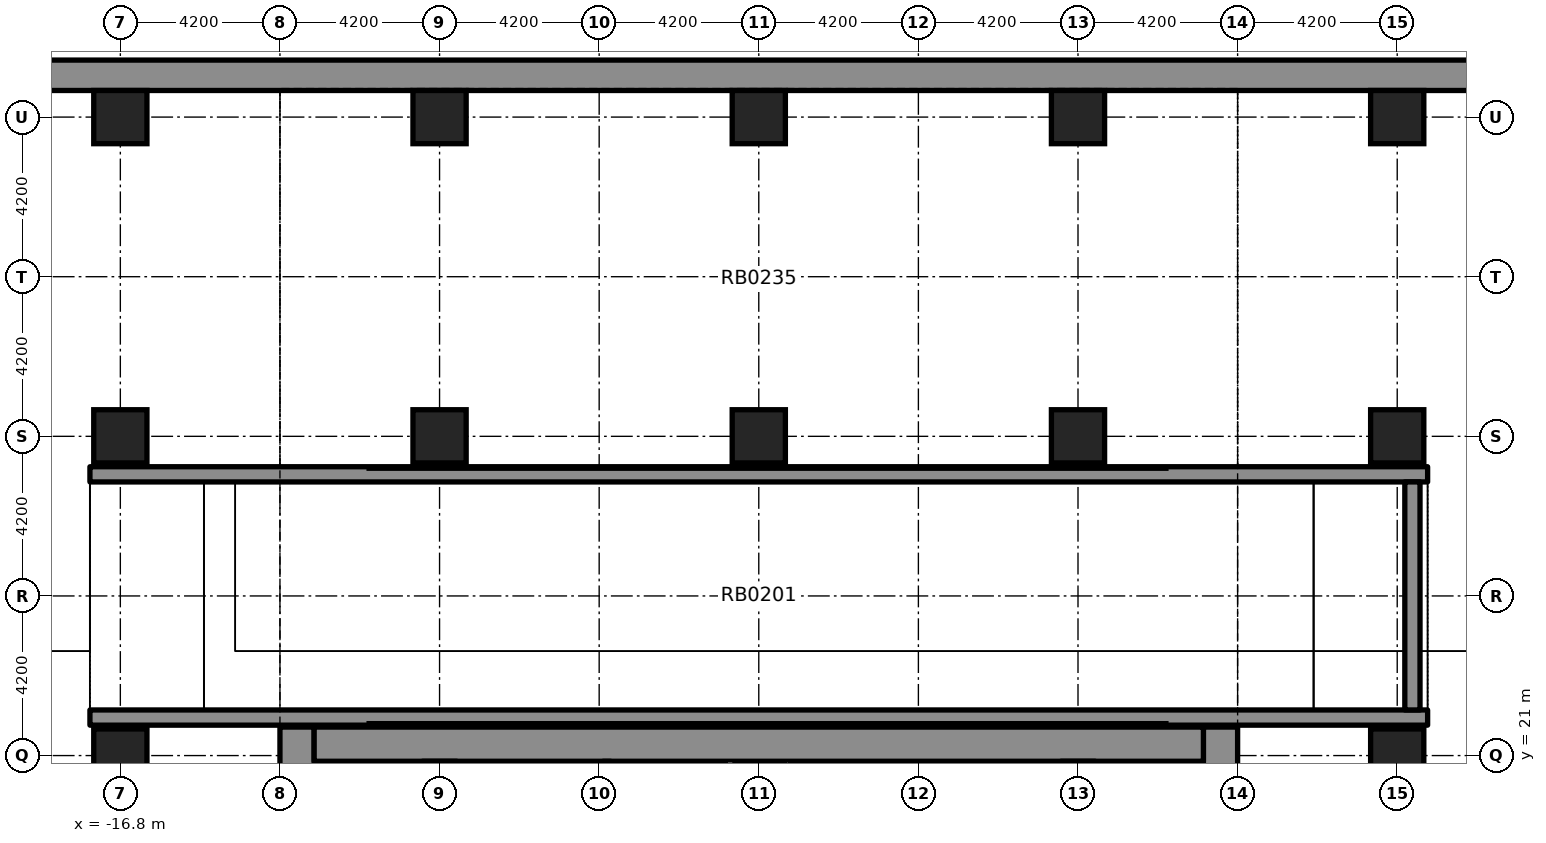
"""IFC4 building model, lengths in metres.
Left out: names, types, materials, properties, quantities, classifications, styles, units other than length and angle.
Written with IfcOpenShell. Run it as: python <this file> out.ifc"""

import sys

from ifc_helpers import new_model, si_unit, direction, frame, frame_2d, origin, origin_2d, place, context, subcontext, project, spatial, polyline, rectangle, outline, extrude, element, save


model = new_model("IFC4")
c1 = context("Model", 3, precision=1e-05, world=origin(), true_north=direction((0.0, 1.0)))
c2 = subcontext(c1, "Body", "Model", "MODEL_VIEW")
j1 = project(units=[si_unit("LENGTHUNIT", "METRE"), si_unit("PLANEANGLEUNIT", "RADIAN")], contexts=[c1])
p1 = place(None, origin())
s1 = spatial("IfcSite", under=j1, at=p1, CompositionType="ELEMENT")
p2 = place(p1, origin())
s2 = spatial("IfcBuilding", under=s1, at=p2, CompositionType="ELEMENT")
p3 = place(p2, frame((0.0, 0.0, -8.4)))
s3 = spatial("IfcBuildingStorey", under=s2, at=p3, CompositionType="ELEMENT", Elevation=-8.4)
p4 = place(p3, frame((12.15, -8.4, 0.0), z_axis=(0.0, 0.0, 1.0), x_axis=(0.0, 1.0, 0.0)))
e1 = element("IfcWall", 1, at=p4, inside=s3, PredefinedType="SHEAR", context=c2, shape_type="SweptSolid", body=[
    extrude(rectangle(XDim=30.15, YDim=0.9, at=frame_2d((15.075, 0.0))), origin(), (0.0, 0.0, 1.0), 3.85),
])
p5 = place(p4, frame((3.425, 0.0, 0.0)))
e2 = element("IfcOpeningElement", 2, at=p5, cuts=e1, PredefinedType="OPENING", context=c2, shape_type="SweptSolid", body=[
    extrude(rectangle(XDim=0.95, YDim=2.1, at=frame_2d((0.475, 1.05))), frame((0.0, 0.46, 0.0), z_axis=(0.0, -1.0, 0.0), x_axis=(1.0, 0.0, 0.0)), (0.0, 0.0, 1.0), 0.92),
])
p6 = place(p4, frame((8.075, 0.0, 0.0)))
e3 = element("IfcOpeningElement", 3, at=p6, cuts=e1, PredefinedType="OPENING", context=c2, shape_type="SweptSolid", body=[
    extrude(rectangle(XDim=0.95, YDim=2.1, at=frame_2d((0.475, 1.05))), frame((0.0, 0.46, 0.0), z_axis=(0.0, -1.0, 0.0), x_axis=(1.0, 0.0, 0.0)), (0.0, 0.0, 1.0), 0.92),
])
p7 = place(p4, frame((11.425, 0.0, 0.0)))
e4 = element("IfcOpeningElement", 4, at=p7, cuts=e1, PredefinedType="OPENING", context=c2, shape_type="SweptSolid", body=[
    extrude(rectangle(XDim=0.95, YDim=2.1, at=frame_2d((0.475, 1.05))), frame((0.0, 0.46, 0.0), z_axis=(0.0, -1.0, 0.0), x_axis=(1.0, 0.0, 0.0)), (0.0, 0.0, 1.0), 0.92),
])
p8 = place(p4, frame((15.625, 0.0, 0.0)))
e5 = element("IfcOpeningElement", 5, at=p8, cuts=e1, PredefinedType="OPENING", context=c2, shape_type="SweptSolid", body=[
    extrude(rectangle(XDim=0.95, YDim=2.1, at=frame_2d((0.475, 1.05))), frame((0.0, 0.46, 0.0), z_axis=(0.0, -1.0, 0.0), x_axis=(1.0, 0.0, 0.0)), (0.0, 0.0, 1.0), 0.92),
])
p9 = place(p4, frame((22.725, 0.0, 0.0)))
e6 = element("IfcOpeningElement", 6, at=p9, cuts=e1, PredefinedType="OPENING", context=c2, shape_type="SweptSolid", body=[
    extrude(rectangle(XDim=0.95, YDim=2.1, at=frame_2d((0.475, 1.05))), frame((0.0, 0.46, 0.0), z_axis=(0.0, -1.0, 0.0), x_axis=(1.0, 0.0, 0.0)), (0.0, 0.0, 1.0), 0.92),
])
p10 = place(p4, frame((26.75, 0.0, 0.0)))
e7 = element("IfcOpeningElement", 7, at=p10, cuts=e1, PredefinedType="OPENING", context=c2, shape_type="SweptSolid", body=[
    extrude(rectangle(XDim=0.95, YDim=2.1, at=frame_2d((0.475, 1.05))), frame((0.0, 0.46, 0.0), z_axis=(0.0, -1.0, 0.0), x_axis=(1.0, 0.0, 0.0)), (0.0, 0.0, 1.0), 0.92),
])
p11 = place(p4, frame((19.3, 0.0, 0.0)))
e8 = element("IfcOpeningElement", 8, at=p11, cuts=e1, PredefinedType="OPENING", context=c2, shape_type="SweptSolid", body=[
    extrude(rectangle(XDim=1.2, YDim=2.1, at=frame_2d((0.6, 1.05))), frame((0.0, 0.46, 0.0), z_axis=(0.0, -1.0, 0.0), x_axis=(1.0, 0.0, 0.0)), (0.0, 0.0, 1.0), 0.92),
])
p12 = place(p3, frame((-12.15, -8.4, 0.0), z_axis=(0.0, 0.0, 1.0), x_axis=(0.0, 1.0, 0.0)))
e9 = element("IfcWall", 9, at=p12, inside=s3, PredefinedType="SHEAR", context=c2, shape_type="SweptSolid", body=[
    extrude(rectangle(XDim=30.15, YDim=0.9, at=frame_2d((15.075, 0.0))), origin(), (0.0, 0.0, 1.0), 3.85),
])
p13 = place(p12, frame((2.925, 0.0, 0.0)))
e10 = element("IfcOpeningElement", 10, at=p13, cuts=e9, PredefinedType="OPENING", context=c2, shape_type="SweptSolid", body=[
    extrude(rectangle(XDim=0.95, YDim=2.1, at=frame_2d((0.475, 1.05))), frame((0.0, 0.46, 0.0), z_axis=(0.0, -1.0, 0.0), x_axis=(1.0, 0.0, 0.0)), (0.0, 0.0, 1.0), 0.92),
])
p14 = place(p12, frame((7.025, 0.0, 0.0)))
e11 = element("IfcOpeningElement", 11, at=p14, cuts=e9, PredefinedType="OPENING", context=c2, shape_type="SweptSolid", body=[
    extrude(rectangle(XDim=0.95, YDim=2.1, at=frame_2d((0.475, 1.05))), frame((0.0, 0.46, 0.0), z_axis=(0.0, -1.0, 0.0), x_axis=(1.0, 0.0, 0.0)), (0.0, 0.0, 1.0), 0.92),
])
p15 = place(p12, frame((10.875, 0.0, 0.0)))
e12 = element("IfcOpeningElement", 12, at=p15, cuts=e9, PredefinedType="OPENING", context=c2, shape_type="SweptSolid", body=[
    extrude(rectangle(XDim=0.95, YDim=2.1, at=frame_2d((0.475, 1.05))), frame((0.0, 0.46, 0.0), z_axis=(0.0, -1.0, 0.0), x_axis=(1.0, 0.0, 0.0)), (0.0, 0.0, 1.0), 0.92),
])
p16 = place(p12, frame((15.625, 0.0, 0.0)))
e13 = element("IfcOpeningElement", 13, at=p16, cuts=e9, PredefinedType="OPENING", context=c2, shape_type="SweptSolid", body=[
    extrude(rectangle(XDim=0.95, YDim=2.1, at=frame_2d((0.475, 1.05))), frame((0.0, 0.46, 0.0), z_axis=(0.0, -1.0, 0.0), x_axis=(1.0, 0.0, 0.0)), (0.0, 0.0, 1.0), 0.92),
])
p17 = place(p12, frame((24.75, 0.0, 0.0)))
e14 = element("IfcOpeningElement", 14, at=p17, cuts=e9, PredefinedType="OPENING", context=c2, shape_type="SweptSolid", body=[
    extrude(rectangle(XDim=0.95, YDim=2.1, at=frame_2d((0.475, 1.05))), frame((0.0, 0.46, 0.0), z_axis=(0.0, -1.0, 0.0), x_axis=(1.0, 0.0, 0.0)), (0.0, 0.0, 1.0), 0.92),
])
p18 = place(p12, frame((19.3, 0.0, 0.0)))
e15 = element("IfcOpeningElement", 15, at=p18, cuts=e9, PredefinedType="OPENING", context=c2, shape_type="SweptSolid", body=[
    extrude(rectangle(XDim=1.2, YDim=2.1, at=frame_2d((0.6, 1.05))), frame((0.0, 0.46, 0.0), z_axis=(0.0, -1.0, 0.0), x_axis=(1.0, 0.0, 0.0)), (0.0, 0.0, 1.0), 0.92),
])
p19 = place(p3, frame((-11.7, 21.3, 0.0), z_axis=(0.0, 0.0, 1.0), x_axis=(1.0, 0.0, 0.0)))
e16 = element("IfcWall", 16, at=p19, inside=s3, PredefinedType="SOLIDWALL", context=c2, shape_type="SweptSolid", body=[
    extrude(rectangle(XDim=23.4, YDim=0.9, at=frame_2d((11.7, 0.0))), origin(), (0.0, 0.0, 1.0), 3.85),
])
p20 = place(p3, frame((-8.4, -7.5, 0.0), z_axis=(0.0, 0.0, 1.0), x_axis=(0.0, 1.0, 0.0)))
e17 = element("IfcWall", 17, at=p20, inside=s3, PredefinedType="SHEAR", context=c2, shape_type="SweptSolid", body=[
    extrude(rectangle(XDim=28.35, YDim=0.9, at=frame_2d((14.175, 0.0))), origin(), (0.0, 0.0, 1.0), 3.85),
])
p21 = place(p20, frame((18.4, 0.0, 0.0)))
e18 = element("IfcOpeningElement", 18, at=p21, cuts=e17, PredefinedType="OPENING", context=c2, shape_type="SweptSolid", body=[
    extrude(rectangle(XDim=1.2, YDim=2.1, at=frame_2d((0.6, 1.05))), frame((0.0, 0.46, 0.0), z_axis=(0.0, -1.0, 0.0), x_axis=(1.0, 0.0, 0.0)), (0.0, 0.0, 1.0), 0.92),
])
p22 = place(p3, frame((8.4, -7.5, 0.0), z_axis=(0.0, 0.0, 1.0), x_axis=(0.0, 1.0, 0.0)))
e19 = element("IfcWall", 19, at=p22, inside=s3, PredefinedType="SHEAR", context=c2, shape_type="SweptSolid", body=[
    extrude(rectangle(XDim=28.35, YDim=0.9, at=frame_2d((14.175, 0.0))), origin(), (0.0, 0.0, 1.0), 3.85),
])
p23 = place(p22, frame((18.4, 0.0, 0.0)))
e20 = element("IfcOpeningElement", 20, at=p23, cuts=e19, PredefinedType="OPENING", context=c2, shape_type="SweptSolid", body=[
    extrude(rectangle(XDim=1.2, YDim=2.1, at=frame_2d((0.6, 1.05))), frame((0.0, 0.46, 0.0), z_axis=(0.0, -1.0, 0.0), x_axis=(1.0, 0.0, 0.0)), (0.0, 0.0, 1.0), 0.92),
])
for number, where, z_axis, x_axis in (
    (21, (-16.8, 21.0, 0.0), (0.0, 0.0, 1.0), (1.0, 0.0, 0.0)),
    (22, (16.8, 21.0, 0.0), (0.0, 0.0, 1.0), (1.0, 0.0, 0.0)),
):
    element("IfcColumn", number, at=place(p3, frame(where, z_axis=z_axis, x_axis=x_axis)), inside=s3, PredefinedType="COLUMN", context=c2, shape_type="SweptSolid", body=[
        extrude(rectangle(XDim=1.4, YDim=1.4, at=origin_2d()), origin(), (0.0, 0.0, 1.0), 3.85),
    ])
p24 = place(p3, frame((-43.5, 38.9, -0.5), z_axis=(0.0, 0.0, 1.0), x_axis=(1.0, 0.0, 0.0)))
e23 = element("IfcWall", 23, at=p24, inside=s3, PredefinedType="SOLIDWALL", context=c2, shape_type="SweptSolid", body=[
    extrude(rectangle(XDim=103.8, YDim=0.8, at=frame_2d((51.9, 0.0))), origin(), (0.0, 0.0, 1.0), 4.7),
])
for number, where, z_axis, x_axis in (
    (24, (-16.8, 29.4, -0.5), (0.0, 0.0, 1.0), (1.0, 0.0, 0.0)),
    (25, (-8.4, 29.4, -0.5), (0.0, 0.0, 1.0), (1.0, 0.0, 0.0)),
    (26, (0.0, 29.4, -0.5), (0.0, 0.0, 1.0), (1.0, 0.0, 0.0)),
    (27, (8.4, 29.4, -0.5), (0.0, 0.0, 1.0), (1.0, 0.0, 0.0)),
    (28, (16.8, 29.4, -0.5), (0.0, 0.0, 1.0), (1.0, 0.0, 0.0)),
    (29, (-16.8, 37.8, -0.5), (0.0, 0.0, 1.0), (1.0, 0.0, 0.0)),
    (30, (-8.4, 37.8, -0.5), (0.0, 0.0, 1.0), (1.0, 0.0, 0.0)),
    (31, (0.0, 37.8, -0.5), (0.0, 0.0, 1.0), (1.0, 0.0, 0.0)),
    (32, (8.4, 37.8, -0.5), (0.0, 0.0, 1.0), (1.0, 0.0, 0.0)),
    (33, (16.8, 37.8, -0.5), (0.0, 0.0, 1.0), (1.0, 0.0, 0.0)),
):
    element("IfcColumn", number, at=place(p3, frame(where, z_axis=z_axis, x_axis=x_axis)), inside=s3, PredefinedType="COLUMN", context=c2, shape_type="SweptSolid", body=[
        extrude(rectangle(XDim=1.4, YDim=1.4, at=origin_2d()), origin(), (0.0, 0.0, 1.0), 4.7),
    ])
for number, where, z_axis, x_axis in (
    (34, (-17.6, 28.4, 0.0), (0.0, 0.0, 1.0), (1.0, 0.0, 0.0)),
    (35, (-17.6, 22.0, 0.0), (0.0, 0.0, 1.0), (1.0, 0.0, 0.0)),
):
    element("IfcWall", number, at=place(p3, frame(where, z_axis=z_axis, x_axis=x_axis)), inside=s3, PredefinedType="SOLIDWALL", context=c2, shape_type="SweptSolid", body=[
        extrude(outline(polyline([(0.0, 0.0), (35.2, 0.0), (35.2, 3.9), (34.6, 3.899), (32.2, 3.702), (3.0, -0.105), (0.0, -0.301), (0.0, 0.0)])), frame((0.0, 0.2, 0.0), z_axis=(0.0, -1.0, 0.0), x_axis=(1.0, 0.0, 0.0)), (0.0, 0.0, 1.0), 0.4),
    ])
p25 = place(p3, frame((17.2, 22.2, 0.0), z_axis=(0.0, 0.0, 1.0), x_axis=(0.0, 1.0, 0.0)))
e36 = element("IfcWall", 36, at=p25, inside=s3, PredefinedType="SOLIDWALL", context=c2, shape_type="SweptSolid", body=[
    extrude(rectangle(XDim=6.0, YDim=0.4, at=frame_2d((3.0, 0.0))), origin(), (0.0, 0.0, 1.0), 3.9),
])
p26 = place(p3, frame((-4.0, 13.35, 0.0), z_axis=(0.0, 0.0, 1.0), x_axis=(0.0, 1.0, 0.0)))
e37 = element("IfcWall", 37, at=p26, inside=s3, PredefinedType="SOLIDWALL", context=c2, shape_type="SweptSolid", body=[
    extrude(rectangle(XDim=7.499, YDim=0.2, at=frame_2d((3.75, 0.0))), origin(), (0.0, 0.0, 1.0), 3.85),
])
p27 = place(p3, frame((-0.75, 13.325, 0.0), z_axis=(0.0, 0.0, 1.0), x_axis=(0.0, 1.0, 0.0)))
e38 = element("IfcWall", 38, at=p27, inside=s3, PredefinedType="PARTITIONING", context=c2, shape_type="SweptSolid", body=[
    extrude(rectangle(XDim=7.524, YDim=0.2, at=frame_2d((3.762, 0.0))), origin(), (0.0, 0.0, 1.0), 3.85),
])
p28 = place(p27, frame((4.8, 0.0, 0.0)))
e39 = element("IfcOpeningElement", 39, at=p28, cuts=e38, PredefinedType="OPENING", context=c2, shape_type="SweptSolid", body=[
    extrude(rectangle(XDim=0.95, YDim=2.1, at=frame_2d((0.475, 1.05))), frame((0.0, 0.11, 0.0), z_axis=(0.0, -1.0, 0.0), x_axis=(1.0, 0.0, 0.0)), (0.0, 0.0, 1.0), 0.22),
])
p29 = place(p3, frame((0.75, 16.05, 0.0), z_axis=(0.0, 0.0, 1.0), x_axis=(0.0, 1.0, 0.0)))
e40 = element("IfcWall", 40, at=p29, inside=s3, PredefinedType="PARTITIONING", context=c2, shape_type="SweptSolid", body=[
    extrude(rectangle(XDim=4.799, YDim=0.1, at=frame_2d((2.399, 0.0))), origin(), (0.0, 0.0, 1.0), 3.85),
])
p30 = place(p29, frame((1.875, 0.0, 0.0)))
e41 = element("IfcOpeningElement", 41, at=p30, cuts=e40, PredefinedType="OPENING", context=c2, shape_type="SweptSolid", body=[
    extrude(rectangle(XDim=0.95, YDim=2.1, at=frame_2d((0.475, 1.05))), frame((0.0, 0.06, 0.0), z_axis=(0.0, -1.0, 0.0), x_axis=(1.0, 0.0, 0.0)), (0.0, 0.0, 1.0), 0.12),
])
for number, where, z_axis, x_axis in (
    (42, (-7.7, 13.4, 0.0), (0.0, 0.0, 1.0), (0.0, 1.0, 0.0)),
    (43, (7.7, 13.4, 0.0), (0.0, 0.0, 1.0), (0.0, 1.0, 0.0)),
):
    element("IfcWall", number, at=place(p3, frame(where, z_axis=z_axis, x_axis=x_axis)), inside=s3, PredefinedType="SOLIDWALL", context=c2, shape_type="SweptSolid", body=[
        extrude(rectangle(XDim=7.4, YDim=0.2, at=frame_2d((3.7, 0.0))), origin(), (0.0, 0.0, 1.0), 3.85),
    ])
save(model, sys.argv[1])
